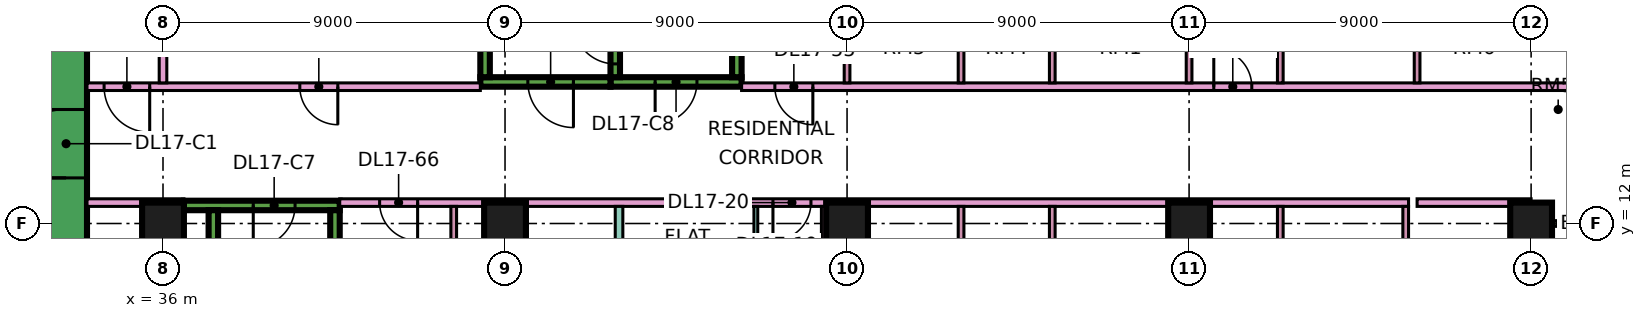
"""IFC4 building model, lengths in metres.
Left out: names, types, materials, properties, quantities, classifications, styles, units other than length and angle.
Written with IfcOpenShell. Run it as: python <this file> out.ifc"""

import sys

from ifc_helpers import new_model, si_unit, direction, frame, frame_2d, origin, origin_2d, place, context, subcontext, project, spatial, rectangle, extrude, element, fill, save


model = new_model("IFC4")
c1 = context("Model", 3, precision=1e-05, world=origin(), true_north=direction((0.0, 1.0)))
c2 = subcontext(c1, "Body", "Model", "MODEL_VIEW")
j1 = project(units=[si_unit("LENGTHUNIT", "METRE"), si_unit("PLANEANGLEUNIT", "RADIAN")], contexts=[c1])
p1 = place(None, origin())
s1 = spatial("IfcSite", under=j1, at=p1, CompositionType="ELEMENT")
p2 = place(p1, origin())
s2 = spatial("IfcBuilding", under=s1, at=p2, CompositionType="ELEMENT")
p3 = place(p2, frame((0.0, 0.0, 78.9)))
s3 = spatial("IfcBuildingStorey", under=s2, at=p3, CompositionType="ELEMENT", Elevation=78.9)
for number, where, z_axis, x_axis in (
    (1, (36.0, 12.0, 0.0), (0.0, 0.0, 1.0), (1.0, 0.0, 0.0)),
    (2, (45.0, 12.0, 0.0), (0.0, 0.0, 1.0), (1.0, 0.0, 0.0)),
    (3, (54.0, 12.0, 0.0), (0.0, 0.0, 1.0), (1.0, 0.0, 0.0)),
    (4, (63.0, 12.0, 0.0), (0.0, 0.0, 1.0), (1.0, 0.0, 0.0)),
    (5, (72.0, 12.0, 0.0), (0.0, 0.0, 1.0), (1.0, 0.0, 0.0)),
):
    element("IfcColumn", number, at=place(p3, frame(where, z_axis=z_axis, x_axis=x_axis)), inside=s3, PredefinedType="COLUMN", context=c2, shape_type="SweptSolid", body=[
        extrude(rectangle(XDim=1.1, YDim=1.1, at=origin_2d()), origin(), (0.0, 0.0, 1.0), 3.75),
    ])
p4 = place(p3, frame((33.45, 8.1, 0.0), z_axis=(0.0, 0.0, 1.0), x_axis=(0.0, 1.0, 0.0)))
e6 = element("IfcWall", 6, at=p4, inside=s3, PredefinedType="SHEAR", context=c2, shape_type="SweptSolid", body=[
    extrude(rectangle(XDim=10.8, YDim=1.1, at=frame_2d((5.4, 0.0))), origin(), (0.0, 0.0, 1.0), 3.75),
])
p5 = place(p4, frame((5.1, 0.0, 0.0)))
e7 = element("IfcOpeningElement", 7, at=p5, cuts=e6, PredefinedType="OPENING", context=c2, shape_type="SweptSolid", body=[
    extrude(rectangle(XDim=1.8, YDim=2.4, at=frame_2d((0.9, 1.2))), frame((0.0, 0.56, 0.0), z_axis=(0.0, -1.0, 0.0), x_axis=(1.0, 0.0, 0.0)), (0.0, 0.0, 1.0), 1.12),
])
p6 = place(p3, frame((36.55, 12.475, 0.0), z_axis=(0.0, 0.0, 1.0), x_axis=(1.0, 0.0, 0.0)))
e8 = element("IfcWall", 8, at=p6, inside=s3, PredefinedType="SHEAR", context=c2, shape_type="SweptSolid", body=[
    extrude(rectangle(XDim=4.1, YDim=0.25, at=frame_2d((2.05, 0.0))), origin(), (0.0, 0.0, 1.0), 3.75),
])
p7 = place(p6, frame((1.825, 0.0, 0.0)))
e9 = element("IfcOpeningElement", 9, at=p7, cuts=e8, PredefinedType="OPENING", context=c2, shape_type="SweptSolid", body=[
    extrude(rectangle(XDim=1.1, YDim=2.2, at=frame_2d((0.55, 1.1))), frame((0.0, 0.135, 0.0), z_axis=(0.0, -1.0, 0.0), x_axis=(1.0, 0.0, 0.0)), (0.0, 0.0, 1.0), 0.27),
])
for number, where, z_axis, x_axis in (
    (10, (37.325, 5.85, 0.0), (0.0, 0.0, 1.0), (0.0, 1.0, 0.0)),
    (11, (40.525, 5.85, 0.0), (0.0, 0.0, 1.0), (0.0, 1.0, 0.0)),
):
    element("IfcWall", number, at=place(p3, frame(where, z_axis=z_axis, x_axis=x_axis)), inside=s3, PredefinedType="SHEAR", context=c2, shape_type="SweptSolid", body=[
        extrude(rectangle(XDim=6.5, YDim=0.25, at=frame_2d((3.25, 0.0))), origin(), (0.0, 0.0, 1.0), 3.75),
    ])
p8 = place(p3, frame((47.775, 15.725, 0.0), z_axis=(0.0, 0.0, 1.0), x_axis=(1.0, 0.0, 0.0)))
e12 = element("IfcWall", 12, at=p8, inside=s3, PredefinedType="SHEAR", context=c2, shape_type="SweptSolid", body=[
    extrude(rectangle(XDim=3.45, YDim=0.25, at=frame_2d((1.725, 0.0))), origin(), (0.0, 0.0, 1.0), 3.75),
])
p9 = place(p8, frame((1.175, 0.0, 0.0)))
e13 = element("IfcOpeningElement", 13, at=p9, cuts=e12, PredefinedType="OPENING", context=c2, shape_type="SweptSolid", body=[
    extrude(rectangle(XDim=1.1, YDim=2.2, at=frame_2d((0.55, 1.1))), frame((0.0, 0.135, 0.0), z_axis=(0.0, -1.0, 0.0), x_axis=(1.0, 0.0, 0.0)), (0.0, 0.0, 1.0), 0.27),
])
p10 = place(p3, frame((47.9, 15.85, 0.0), z_axis=(0.0, 0.0, 1.0), x_axis=(0.0, 1.0, 0.0)))
e14 = element("IfcWall", 14, at=p10, inside=s3, PredefinedType="SHEAR", context=c2, shape_type="SweptSolid", body=[
    extrude(rectangle(XDim=6.5, YDim=0.25, at=frame_2d((3.25, 0.0))), origin(), (0.0, 0.0, 1.0), 3.75),
])
p11 = place(p10, frame((0.35, 0.0, 0.0)))
e15 = element("IfcOpeningElement", 15, at=p11, cuts=e14, PredefinedType="OPENING", context=c2, shape_type="SweptSolid", body=[
    extrude(rectangle(XDim=1.1, YDim=2.2, at=frame_2d((0.55, 1.1))), frame((0.0, 0.135, 0.0), z_axis=(0.0, -1.0, 0.0), x_axis=(1.0, 0.0, 0.0)), (0.0, 0.0, 1.0), 0.27),
])
p12 = place(p3, frame((51.1, 15.85, 0.0), z_axis=(0.0, 0.0, 1.0), x_axis=(0.0, 1.0, 0.0)))
e16 = element("IfcWall", 16, at=p12, inside=s3, PredefinedType="SHEAR", context=c2, shape_type="SweptSolid", body=[
    extrude(rectangle(XDim=6.5, YDim=0.25, at=frame_2d((3.25, 0.0))), origin(), (0.0, 0.0, 1.0), 3.75),
])
p13 = place(p3, frame((44.35, 15.725, 0.0), z_axis=(0.0, 0.0, 1.0), x_axis=(1.0, 0.0, 0.0)))
e17 = element("IfcWall", 17, at=p13, inside=s3, PredefinedType="SHEAR", context=c2, shape_type="SweptSolid", body=[
    extrude(rectangle(XDim=3.425, YDim=0.25, at=frame_2d((1.712, 0.0))), origin(), (0.0, 0.0, 1.0), 3.75),
])
p14 = place(p13, frame((1.25, 0.0, 0.0)))
e18 = element("IfcOpeningElement", 18, at=p14, cuts=e17, PredefinedType="OPENING", context=c2, shape_type="SweptSolid", body=[
    extrude(rectangle(XDim=1.2, YDim=2.2, at=frame_2d((0.6, 1.1))), frame((0.0, 0.135, 0.0), z_axis=(0.0, -1.0, 0.0), x_axis=(1.0, 0.0, 0.0)), (0.0, 0.0, 1.0), 0.27),
])
p15 = place(p3, frame((44.475, 15.85, 0.0), z_axis=(0.0, 0.0, 1.0), x_axis=(0.0, 1.0, 0.0)))
e19 = element("IfcWall", 19, at=p15, inside=s3, PredefinedType="SHEAR", context=c2, shape_type="SweptSolid", body=[
    extrude(rectangle(XDim=6.5, YDim=0.25, at=frame_2d((3.25, 0.0))), origin(), (0.0, 0.0, 1.0), 3.75),
])
p16 = place(p15, frame((1.75, 0.0, 0.0)))
e20 = element("IfcOpeningElement", 20, at=p16, cuts=e19, PredefinedType="OPENING", context=c2, shape_type="SweptSolid", body=[
    extrude(rectangle(XDim=1.1, YDim=2.2, at=frame_2d((0.55, 1.1))), frame((0.0, 0.135, 0.0), z_axis=(0.0, -1.0, 0.0), x_axis=(1.0, 0.0, 0.0)), (0.0, 0.0, 1.0), 0.27),
])
p17 = place(p15, frame((4.3, 0.0, 0.0)))
e21 = element("IfcOpeningElement", 21, at=p17, cuts=e19, PredefinedType="OPENING", context=c2, shape_type="SweptSolid", body=[
    extrude(rectangle(XDim=1.1, YDim=2.2, at=frame_2d((0.55, 1.1))), frame((0.0, 0.135, 0.0), z_axis=(0.0, -1.0, 0.0), x_axis=(1.0, 0.0, 0.0)), (0.0, 0.0, 1.0), 0.27),
])
p18 = place(p3, frame((72.0, 1.575, 0.0), z_axis=(0.0, 0.0, 1.0), x_axis=(0.0, 1.0, 0.0)))
e22 = element("IfcWall", 22, at=p18, inside=s3, PredefinedType="SOLIDWALL", context=c2, shape_type="SweptSolid", body=[
    extrude(rectangle(XDim=10.35, YDim=0.15, at=frame_2d((5.175, 0.0))), origin(), (0.0, 0.0, 1.0), 3.35),
])
p19 = place(p18, frame((1.887, 0.0, 0.0)))
e23 = element("IfcOpeningElement", 23, at=p19, cuts=e22, PredefinedType="OPENING", context=c2, shape_type="SweptSolid", body=[
    extrude(rectangle(XDim=1.8, YDim=2.4, at=frame_2d((0.9, 1.2))), frame((0.0, 0.085, 0.0), z_axis=(0.0, -1.0, 0.0), x_axis=(1.0, 0.0, 0.0)), (0.0, 0.0, 1.0), 0.17),
])
p20 = place(p18, frame((7.675, 0.0, 1.7)))
e24 = element("IfcOpeningElement", 24, at=p20, cuts=e22, PredefinedType="OPENING", context=c2, shape_type="SweptSolid", body=[
    extrude(rectangle(XDim=1.2, YDim=0.9, at=frame_2d((0.6, 0.45))), frame((0.0, 0.085, 0.0), z_axis=(0.0, -1.0, 0.0), x_axis=(1.0, 0.0, 0.0)), (0.0, 0.0, 1.0), 0.17),
])
p21 = place(p3, frame((73.5, 12.0, 0.0), z_axis=(0.0, 0.0, 1.0), x_axis=(-1.0, 0.0, 0.0)))
e25 = element("IfcWall", 25, at=p21, inside=s3, PredefinedType="SOLIDWALL", context=c2, shape_type="SweptSolid", body=[
    extrude(rectangle(XDim=1.5, YDim=0.15, at=frame_2d((0.75, 0.0))), origin(), (0.0, 0.0, 1.0), 3.35),
])
p22 = place(p3, frame((34.0, 12.55, 0.0), z_axis=(0.0, 0.0, 1.0), x_axis=(1.0, 0.0, 0.0)))
e26 = element("IfcWall", 26, at=p22, inside=s3, PredefinedType="PARTITIONING", context=c2, shape_type="SweptSolid", body=[
    extrude(rectangle(XDim=2.551, YDim=0.2, at=frame_2d((1.275, 0.0))), origin(), (0.0, 0.0, 1.0), 3.35),
])
p23 = place(p3, frame((34.0, 15.6, 0.0), z_axis=(0.0, 0.0, 1.0), x_axis=(1.0, 0.0, 0.0)))
e27 = element("IfcWall", 27, at=p23, inside=s3, PredefinedType="PARTITIONING", context=c2, shape_type="SweptSolid", body=[
    extrude(rectangle(XDim=10.35, YDim=0.2, at=frame_2d((5.175, 0.0))), origin(), (0.0, 0.0, 1.0), 3.35),
])
p24 = place(p23, frame((5.6, 0.0, 0.0)))
e28 = element("IfcOpeningElement", 28, at=p24, cuts=e27, PredefinedType="OPENING", context=c2, shape_type="SweptSolid", body=[
    extrude(rectangle(XDim=1.0, YDim=2.1, at=frame_2d((0.5, 1.05))), frame((0.0, 0.11, 0.0), z_axis=(0.0, -1.0, 0.0), x_axis=(1.0, 0.0, 0.0)), (0.0, 0.0, 1.0), 0.22),
])
p25 = place(p23, frame((0.45, 0.0, 0.0)))
e29 = element("IfcOpeningElement", 29, at=p25, cuts=e27, PredefinedType="OPENING", context=c2, shape_type="SweptSolid", body=[
    extrude(rectangle(XDim=1.2, YDim=2.1, at=frame_2d((0.6, 1.05))), frame((0.0, 0.11, 0.0), z_axis=(0.0, -1.0, 0.0), x_axis=(1.0, 0.0, 0.0)), (0.0, 0.0, 1.0), 0.22),
])
p26 = place(p3, frame((36.0, 15.7, 0.0), z_axis=(0.0, 0.0, 1.0), x_axis=(0.0, 1.0, 0.0)))
e30 = element("IfcWall", 30, at=p26, inside=s3, PredefinedType="PARTITIONING", context=c2, shape_type="SweptSolid", body=[
    extrude(rectangle(XDim=8.3, YDim=0.2, at=frame_2d((4.15, 0.0))), origin(), (0.0, 0.0, 1.0), 3.35),
])
p27 = place(p3, frame((40.65, 12.55, 0.0), z_axis=(0.0, 0.0, 1.0), x_axis=(1.0, 0.0, 0.0)))
e31 = element("IfcWall", 31, at=p27, inside=s3, PredefinedType="PARTITIONING", context=c2, shape_type="SweptSolid", body=[
    extrude(rectangle(XDim=28.125, YDim=0.2, at=frame_2d((14.062, 0.0))), origin(), (0.0, 0.0, 1.0), 3.35),
])
p28 = place(p27, frame((11.4, 0.0, 0.0)))
e32 = element("IfcOpeningElement", 32, at=p28, cuts=e31, PredefinedType="OPENING", context=c2, shape_type="SweptSolid", body=[
    extrude(rectangle(XDim=1.0, YDim=2.1, at=frame_2d((0.5, 1.05))), frame((0.0, 0.11, 0.0), z_axis=(0.0, -1.0, 0.0), x_axis=(1.0, 0.0, 0.0)), (0.0, 0.0, 1.0), 0.22),
])
p29 = place(p27, frame((1.05, 0.0, 0.0)))
e33 = element("IfcOpeningElement", 33, at=p29, cuts=e31, PredefinedType="OPENING", context=c2, shape_type="SweptSolid", body=[
    extrude(rectangle(XDim=1.0, YDim=2.1, at=frame_2d((0.5, 1.05))), frame((0.0, 0.11, 0.0), z_axis=(0.0, -1.0, 0.0), x_axis=(1.0, 0.0, 0.0)), (0.0, 0.0, 1.0), 0.22),
])
p30 = place(p3, frame((43.65, 5.825, 0.0), z_axis=(0.0, 0.0, 1.0), x_axis=(0.0, 1.0, 0.0)))
e34 = element("IfcWall", 34, at=p30, inside=s3, PredefinedType="PARTITIONING", context=c2, shape_type="SweptSolid", body=[
    extrude(rectangle(XDim=6.625, YDim=0.15, at=frame_2d((3.312, 0.0))), origin(), (0.0, 0.0, 1.0), 3.35),
])
p31 = place(p30, frame((4.425, 0.0, 0.0)))
e35 = element("IfcOpeningElement", 35, at=p31, cuts=e34, PredefinedType="OPENING", context=c2, shape_type="SweptSolid", body=[
    extrude(rectangle(XDim=0.9, YDim=2.1, at=frame_2d((0.45, 1.05))), frame((0.0, 0.085, 0.0), z_axis=(0.0, -1.0, 0.0), x_axis=(1.0, 0.0, 0.0)), (0.0, 0.0, 1.0), 0.17),
])
p32 = place(p3, frame((48.0, 0.0, 0.0), z_axis=(0.0, 0.0, 1.0), x_axis=(0.0, 1.0, 0.0)))
e36 = element("IfcWall", 36, at=p32, inside=s3, PredefinedType="PARTITIONING", context=c2, shape_type="SweptSolid", body=[
    extrude(rectangle(XDim=12.45, YDim=0.2, at=frame_2d((6.225, 0.0))), origin(), (0.0, 0.0, 1.0), 3.35),
])
p33 = place(p3, frame((51.225, 15.6, 0.0), z_axis=(0.0, 0.0, 1.0), x_axis=(1.0, 0.0, 0.0)))
e37 = element("IfcWall", 37, at=p33, inside=s3, PredefinedType="PARTITIONING", context=c2, shape_type="SweptSolid", body=[
    extrude(rectangle(XDim=22.125, YDim=0.2, at=frame_2d((11.062, 0.0))), origin(), (0.0, 0.0, 1.0), 3.35),
])
p34 = place(p33, frame((12.425, 0.0, 0.0)))
e38 = element("IfcOpeningElement", 38, at=p34, cuts=e37, PredefinedType="OPENING", context=c2, shape_type="SweptSolid", body=[
    extrude(rectangle(XDim=1.0, YDim=2.1, at=frame_2d((0.5, 1.05))), frame((0.0, 0.11, 0.0), z_axis=(0.0, -1.0, 0.0), x_axis=(1.0, 0.0, 0.0)), (0.0, 0.0, 1.0), 0.22),
])
p35 = place(p33, frame((0.875, 0.0, 0.0)))
e39 = element("IfcOpeningElement", 39, at=p35, cuts=e37, PredefinedType="OPENING", context=c2, shape_type="SweptSolid", body=[
    extrude(rectangle(XDim=1.0, YDim=2.1, at=frame_2d((0.5, 1.05))), frame((0.0, 0.11, 0.0), z_axis=(0.0, -1.0, 0.0), x_axis=(1.0, 0.0, 0.0)), (0.0, 0.0, 1.0), 0.22),
])
p36 = place(p3, frame((51.6, 8.3, 0.0), z_axis=(0.0, 0.0, 1.0), x_axis=(0.0, 1.0, 0.0)))
e40 = element("IfcWall", 40, at=p36, inside=s3, PredefinedType="PARTITIONING", context=c2, shape_type="SweptSolid", body=[
    extrude(rectangle(XDim=4.15, YDim=0.1, at=frame_2d((2.075, 0.0))), origin(), (0.0, 0.0, 1.0), 3.35),
])
p37 = place(p36, frame((1.7, 0.0, 0.0)))
e41 = element("IfcOpeningElement", 41, at=p37, cuts=e40, PredefinedType="OPENING", context=c2, shape_type="SweptSolid", body=[
    extrude(rectangle(XDim=0.9, YDim=2.1, at=frame_2d((0.45, 1.05))), frame((0.0, 0.06, 0.0), z_axis=(0.0, -1.0, 0.0), x_axis=(1.0, 0.0, 0.0)), (0.0, 0.0, 1.0), 0.12),
])
p38 = place(p3, frame((53.4, 8.425, 0.0), z_axis=(0.0, 0.0, 1.0), x_axis=(0.0, 1.0, 0.0)))
e42 = element("IfcWall", 42, at=p38, inside=s3, PredefinedType="PARTITIONING", context=c2, shape_type="SweptSolid", body=[
    extrude(rectangle(XDim=4.025, YDim=0.15, at=frame_2d((2.012, 0.0))), origin(), (0.0, 0.0, 1.0), 3.35),
])
p39 = place(p38, frame((1.575, 0.0, 0.0)))
e43 = element("IfcOpeningElement", 43, at=p39, cuts=e42, PredefinedType="OPENING", context=c2, shape_type="SweptSolid", body=[
    extrude(rectangle(XDim=0.8, YDim=2.1, at=frame_2d((0.4, 1.05))), frame((0.0, 0.085, 0.0), z_axis=(0.0, -1.0, 0.0), x_axis=(1.0, 0.0, 0.0)), (0.0, 0.0, 1.0), 0.17),
])
p40 = place(p3, frame((54.0, 15.7, 0.0), z_axis=(0.0, 0.0, 1.0), x_axis=(0.0, 1.0, 0.0)))
e44 = element("IfcWall", 44, at=p40, inside=s3, PredefinedType="PARTITIONING", context=c2, shape_type="SweptSolid", body=[
    extrude(rectangle(XDim=2.9, YDim=0.15, at=frame_2d((1.45, 0.0))), origin(), (0.0, 0.0, 1.0), 3.35),
])
p41 = place(p3, frame((57.0, 8.425, 0.0), z_axis=(0.0, 0.0, 1.0), x_axis=(0.0, 1.0, 0.0)))
e45 = element("IfcWall", 45, at=p41, inside=s3, PredefinedType="PARTITIONING", context=c2, shape_type="SweptSolid", body=[
    extrude(rectangle(XDim=4.025, YDim=0.15, at=frame_2d((2.012, 0.0))), origin(), (0.0, 0.0, 1.0), 3.35),
])
p42 = place(p3, frame((57.0, 15.7, 0.0), z_axis=(0.0, 0.0, 1.0), x_axis=(0.0, 1.0, 0.0)))
e46 = element("IfcWall", 46, at=p42, inside=s3, PredefinedType="PARTITIONING", context=c2, shape_type="SweptSolid", body=[
    extrude(rectangle(XDim=2.825, YDim=0.15, at=frame_2d((1.413, 0.0))), origin(), (0.0, 0.0, 1.0), 3.35),
])
p43 = place(p3, frame((59.4, 8.425, 0.0), z_axis=(0.0, 0.0, 1.0), x_axis=(0.0, 1.0, 0.0)))
e47 = element("IfcWall", 47, at=p43, inside=s3, PredefinedType="PARTITIONING", context=c2, shape_type="SweptSolid", body=[
    extrude(rectangle(XDim=4.025, YDim=0.15, at=frame_2d((2.012, 0.0))), origin(), (0.0, 0.0, 1.0), 3.35),
])
for number, where, z_axis, x_axis in (
    (48, (59.4, 15.7, 0.0), (0.0, 0.0, 1.0), (0.0, 1.0, 0.0)),
    (49, (63.0, 15.7, 0.0), (0.0, 0.0, 1.0), (0.0, 1.0, 0.0)),
):
    element("IfcWall", number, at=place(p3, frame(where, z_axis=z_axis, x_axis=x_axis)), inside=s3, PredefinedType="PARTITIONING", context=c2, shape_type="SweptSolid", body=[
        extrude(rectangle(XDim=2.825, YDim=0.15, at=frame_2d((1.413, 0.0))), origin(), (0.0, 0.0, 1.0), 3.35),
    ])
p44 = place(p3, frame((65.4, 8.425, 0.0), z_axis=(0.0, 0.0, 1.0), x_axis=(0.0, 1.0, 0.0)))
e50 = element("IfcWall", 50, at=p44, inside=s3, PredefinedType="PARTITIONING", context=c2, shape_type="SweptSolid", body=[
    extrude(rectangle(XDim=4.025, YDim=0.15, at=frame_2d((2.012, 0.0))), origin(), (0.0, 0.0, 1.0), 3.35),
])
p45 = place(p3, frame((65.4, 15.7, 0.0), z_axis=(0.0, 0.0, 1.0), x_axis=(0.0, 1.0, 0.0)))
e51 = element("IfcWall", 51, at=p45, inside=s3, PredefinedType="PARTITIONING", context=c2, shape_type="SweptSolid", body=[
    extrude(rectangle(XDim=2.825, YDim=0.15, at=frame_2d((1.413, 0.0))), origin(), (0.0, 0.0, 1.0), 3.35),
])
p46 = place(p3, frame((68.7, 8.425, 0.0), z_axis=(0.0, 0.0, 1.0), x_axis=(0.0, 1.0, 0.0)))
e52 = element("IfcWall", 52, at=p46, inside=s3, PredefinedType="PARTITIONING", context=c2, shape_type="SweptSolid", body=[
    extrude(rectangle(XDim=4.025, YDim=0.15, at=frame_2d((2.012, 0.0))), origin(), (0.0, 0.0, 1.0), 3.35),
])
p47 = place(p3, frame((69.0, 12.55, 0.0), z_axis=(0.0, 0.0, 1.0), x_axis=(1.0, 0.0, 0.0)))
e53 = element("IfcWall", 53, at=p47, inside=s3, PredefinedType="PARTITIONING", context=c2, shape_type="SweptSolid", body=[
    extrude(rectangle(XDim=3.0, YDim=0.2, at=frame_2d((1.5, 0.0))), origin(), (0.0, 0.0, 1.0), 3.35),
])
p48 = place(p3, frame((69.0, 15.7, 0.0), z_axis=(0.0, 0.0, 1.0), x_axis=(0.0, 1.0, 0.0)))
e54 = element("IfcWall", 54, at=p48, inside=s3, PredefinedType="PARTITIONING", context=c2, shape_type="SweptSolid", body=[
    extrude(rectangle(XDim=2.825, YDim=0.15, at=frame_2d((1.413, 0.0))), origin(), (0.0, 0.0, 1.0), 3.35),
])
p49 = place(p5, origin())
e55 = element("IfcDoor", 55, at=p49, inside=s3, OperationType="DOUBLE_DOOR_SINGLE_SWING", PredefinedType="DOOR", context=c2, shape_type="SweptSolid", body=[
    extrude(rectangle(XDim=1.8, YDim=2.4, at=frame_2d((0.9, 1.2))), frame((0.0, 0.025, 0.0), z_axis=(0.0, -1.0, 0.0), x_axis=(1.0, 0.0, 0.0)), (0.0, 0.0, 1.0), 0.05),
])
fill(e7, e55)
p50 = place(p7, frame((1.1, 0.0, 0.0), z_axis=(0.0, 0.0, 1.0), x_axis=(-1.0, 0.0, 0.0)))
e56 = element("IfcDoor", 56, at=p50, inside=s3, OperationType="SINGLE_SWING_LEFT", PredefinedType="DOOR", context=c2, shape_type="SweptSolid", body=[
    extrude(rectangle(XDim=1.1, YDim=2.2, at=frame_2d((0.55, 1.1))), frame((0.0, 0.025, 0.0), z_axis=(0.0, -1.0, 0.0), x_axis=(1.0, 0.0, 0.0)), (0.0, 0.0, 1.0), 0.05),
])
fill(e9, e56)
p51 = place(p9, frame((1.1, 0.0, 0.0), z_axis=(0.0, 0.0, 1.0), x_axis=(-1.0, 0.0, 0.0)))
e57 = element("IfcDoor", 57, at=p51, inside=s3, OperationType="SINGLE_SWING_LEFT", PredefinedType="DOOR", context=c2, shape_type="SweptSolid", body=[
    extrude(rectangle(XDim=1.1, YDim=2.2, at=frame_2d((0.55, 1.1))), frame((0.0, 0.025, 0.0), z_axis=(0.0, -1.0, 0.0), x_axis=(1.0, 0.0, 0.0)), (0.0, 0.0, 1.0), 0.05),
])
fill(e13, e57)
p52 = place(p14, origin())
e58 = element("IfcDoor", 58, at=p52, inside=s3, OperationType="SINGLE_SWING_RIGHT", PredefinedType="DOOR", context=c2, shape_type="SweptSolid", body=[
    extrude(rectangle(XDim=1.2, YDim=2.2, at=frame_2d((0.6, 1.1))), frame((0.0, 0.025, 0.0), z_axis=(0.0, -1.0, 0.0), x_axis=(1.0, 0.0, 0.0)), (0.0, 0.0, 1.0), 0.05),
])
fill(e18, e58)
p53 = place(p11, frame((1.1, 0.0, 0.0), z_axis=(0.0, 0.0, 1.0), x_axis=(-1.0, 0.0, 0.0)))
e59 = element("IfcDoor", 59, at=p53, inside=s3, OperationType="SINGLE_SWING_RIGHT", PredefinedType="DOOR", context=c2, shape_type="SweptSolid", body=[
    extrude(rectangle(XDim=1.1, YDim=2.2, at=frame_2d((0.55, 1.1))), frame((0.0, 0.025, 0.0), z_axis=(0.0, -1.0, 0.0), x_axis=(1.0, 0.0, 0.0)), (0.0, 0.0, 1.0), 0.05),
])
fill(e15, e59)
p54 = place(p24, origin())
e60 = element("IfcDoor", 60, at=p54, inside=s3, OperationType="SINGLE_SWING_RIGHT", PredefinedType="DOOR", context=c2, shape_type="SweptSolid", body=[
    extrude(rectangle(XDim=1.0, YDim=2.1, at=frame_2d((0.5, 1.05))), frame((0.0, 0.025, 0.0), z_axis=(0.0, -1.0, 0.0), x_axis=(1.0, 0.0, 0.0)), (0.0, 0.0, 1.0), 0.05),
])
fill(e28, e60)
p55 = place(p34, origin())
e61 = element("IfcDoor", 61, at=p55, inside=s3, OperationType="SINGLE_SWING_LEFT", PredefinedType="DOOR", context=c2, shape_type="SweptSolid", body=[
    extrude(rectangle(XDim=1.0, YDim=2.1, at=frame_2d((0.5, 1.05))), frame((0.0, 0.025, 0.0), z_axis=(0.0, -1.0, 0.0), x_axis=(1.0, 0.0, 0.0)), (0.0, 0.0, 1.0), 0.05),
])
fill(e38, e61)
p56 = place(p28, frame((1.0, 0.0, 0.0), z_axis=(0.0, 0.0, 1.0), x_axis=(-1.0, 0.0, 0.0)))
e62 = element("IfcDoor", 62, at=p56, inside=s3, OperationType="SINGLE_SWING_LEFT", PredefinedType="DOOR", context=c2, shape_type="SweptSolid", body=[
    extrude(rectangle(XDim=1.0, YDim=2.1, at=frame_2d((0.5, 1.05))), frame((0.0, 0.025, 0.0), z_axis=(0.0, -1.0, 0.0), x_axis=(1.0, 0.0, 0.0)), (0.0, 0.0, 1.0), 0.05),
])
fill(e32, e62)
p57 = place(p25, origin())
e63 = element("IfcDoor", 63, at=p57, inside=s3, OperationType="SINGLE_SWING_RIGHT", PredefinedType="DOOR", context=c2, shape_type="SweptSolid", body=[
    extrude(rectangle(XDim=1.2, YDim=2.1, at=frame_2d((0.6, 1.05))), frame((0.0, 0.025, 0.0), z_axis=(0.0, -1.0, 0.0), x_axis=(1.0, 0.0, 0.0)), (0.0, 0.0, 1.0), 0.05),
])
fill(e29, e63)
p58 = place(p35, origin())
e64 = element("IfcDoor", 64, at=p58, inside=s3, OperationType="SINGLE_SWING_RIGHT", PredefinedType="DOOR", context=c2, shape_type="SweptSolid", body=[
    extrude(rectangle(XDim=1.0, YDim=2.1, at=frame_2d((0.5, 1.05))), frame((0.0, 0.025, 0.0), z_axis=(0.0, -1.0, 0.0), x_axis=(1.0, 0.0, 0.0)), (0.0, 0.0, 1.0), 0.05),
])
fill(e39, e64)
p59 = place(p29, origin())
e65 = element("IfcDoor", 65, at=p59, inside=s3, OperationType="SINGLE_SWING_RIGHT", PredefinedType="DOOR", context=c2, shape_type="SweptSolid", body=[
    extrude(rectangle(XDim=1.0, YDim=2.1, at=frame_2d((0.5, 1.05))), frame((0.0, 0.025, 0.0), z_axis=(0.0, -1.0, 0.0), x_axis=(1.0, 0.0, 0.0)), (0.0, 0.0, 1.0), 0.05),
])
fill(e33, e65)
save(model, sys.argv[1])
